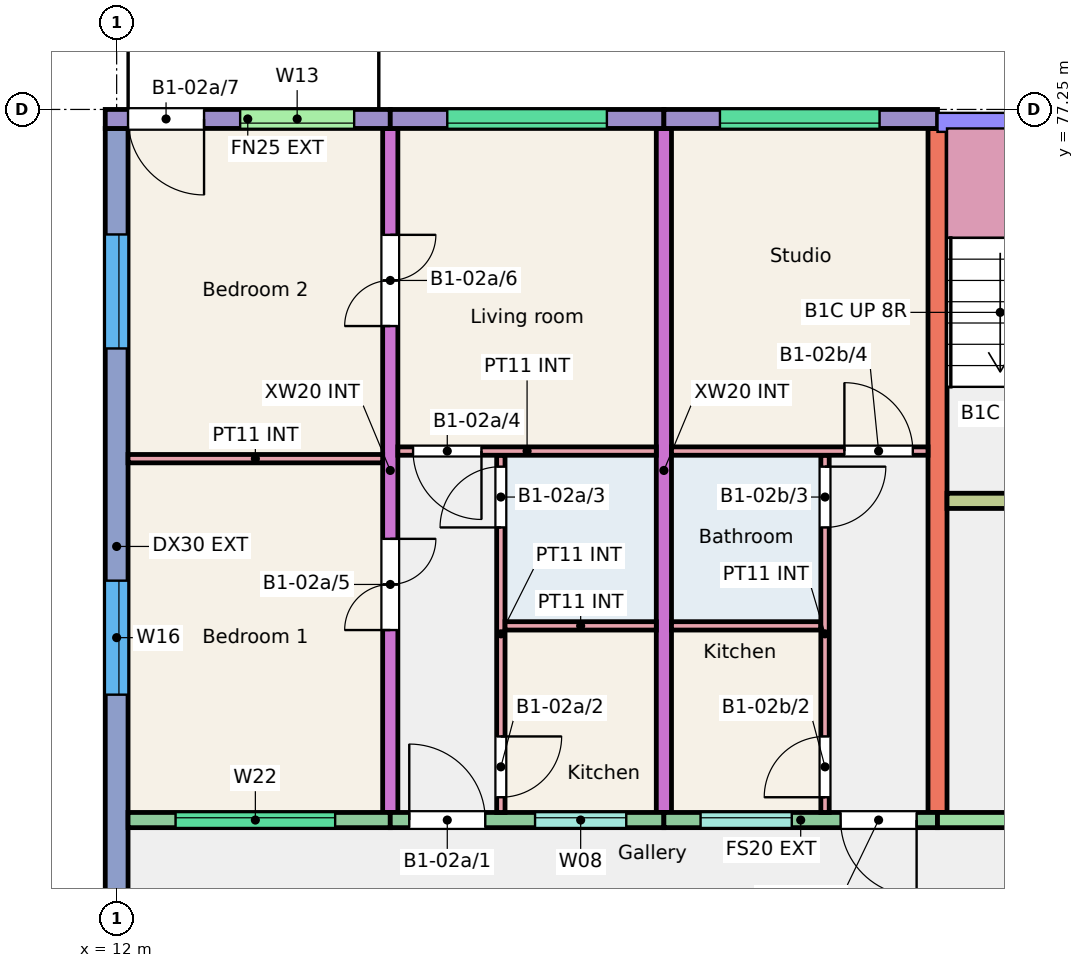
"""IFC4 building model, lengths in metres.
Left out: names, types, materials, properties, quantities, classifications, styles, units other than length and angle.
Written with IfcOpenShell. Run it as: python <this file> out.ifc"""

import sys

from ifc_helpers import new_model, si_unit, direction, frame, frame_2d, origin, place, context, subcontext, project, spatial, rectangle, extrude, element, fill, save


model = new_model("IFC4")
c1 = context("Model", 3, precision=1e-05, world=origin(), true_north=direction((0.0, 1.0)))
c2 = subcontext(c1, "Body", "Model", "MODEL_VIEW")
j1 = project(units=[si_unit("LENGTHUNIT", "METRE"), si_unit("PLANEANGLEUNIT", "RADIAN")], contexts=[c1])
p1 = place(None, origin())
s1 = spatial("IfcSite", under=j1, at=p1, CompositionType="ELEMENT")
p2 = place(p1, origin())
s2 = spatial("IfcBuilding", under=s1, at=p2, CompositionType="ELEMENT")
p3 = place(p2, frame((0.0, 0.0, 6.0)))
s3 = spatial("IfcBuildingStorey", under=s2, at=p3, CompositionType="ELEMENT", Elevation=6.0)
p4 = place(p3, frame((12.0, 66.0, 0.0), z_axis=(0.0, 0.0, 1.0), x_axis=(0.0, 1.0, 0.0)))
e1 = element("IfcWall", 1, at=p4, inside=s3, PredefinedType="SHEAR", context=c2, shape_type="SweptSolid", body=[
    extrude(rectangle(XDim=11.0, YDim=0.3, at=frame_2d((5.5, 0.0))), origin(), (0.0, 0.0, 1.0), 3.0),
])
p5 = place(p4, frame((3.55, 0.0, 0.9)))
e2 = element("IfcOpeningElement", 2, at=p5, cuts=e1, PredefinedType="OPENING", context=c2, shape_type="SweptSolid", body=[
    extrude(rectangle(XDim=1.5, YDim=1.5, at=frame_2d((0.75, 0.75))), frame((0.0, 0.16, 0.0), z_axis=(0.0, -1.0, 0.0), x_axis=(1.0, 0.0, 0.0)), (0.0, 0.0, 1.0), 0.32),
])
p6 = place(p4, frame((8.105, 0.0, 0.9)))
e3 = element("IfcOpeningElement", 3, at=p6, cuts=e1, PredefinedType="OPENING", context=c2, shape_type="SweptSolid", body=[
    extrude(rectangle(XDim=1.5, YDim=1.5, at=frame_2d((0.75, 0.75))), frame((0.0, 0.16, 0.0), z_axis=(0.0, -1.0, 0.0), x_axis=(1.0, 0.0, 0.0)), (0.0, 0.0, 1.0), 0.32),
])
p7 = place(p3, frame((15.6, 68.0, 0.0), z_axis=(0.0, 0.0, 1.0), x_axis=(0.0, 1.0, 0.0)))
e4 = element("IfcWall", 4, at=p7, inside=s3, PredefinedType="SHEAR", context=c2, shape_type="SweptSolid", body=[
    extrude(rectangle(XDim=9.0, YDim=0.2, at=frame_2d((4.5, 0.0))), origin(), (0.0, 0.0, 1.0), 3.0),
])
p8 = place(p7, frame((2.4, 0.0, 0.0)))
e5 = element("IfcOpeningElement", 5, at=p8, cuts=e4, PredefinedType="OPENING", context=c2, shape_type="SweptSolid", body=[
    extrude(rectangle(XDim=1.2, YDim=2.1, at=frame_2d((0.6, 1.05))), frame((0.0, 0.11, 0.0), z_axis=(0.0, -1.0, 0.0), x_axis=(1.0, 0.0, 0.0)), (0.0, 0.0, 1.0), 0.22),
])
p9 = place(p7, frame((6.4, 0.0, 0.0)))
e6 = element("IfcOpeningElement", 6, at=p9, cuts=e4, PredefinedType="OPENING", context=c2, shape_type="SweptSolid", body=[
    extrude(rectangle(XDim=1.2, YDim=2.1, at=frame_2d((0.6, 1.05))), frame((0.0, 0.11, 0.0), z_axis=(0.0, -1.0, 0.0), x_axis=(1.0, 0.0, 0.0)), (0.0, 0.0, 1.0), 0.22),
])
p10 = place(p3, frame((19.2, 68.0, 0.0), z_axis=(0.0, 0.0, 1.0), x_axis=(0.0, 1.0, 0.0)))
e7 = element("IfcWall", 7, at=p10, inside=s3, PredefinedType="SHEAR", context=c2, shape_type="SweptSolid", body=[
    extrude(rectangle(XDim=9.0, YDim=0.2, at=frame_2d((4.5, 0.0))), origin(), (0.0, 0.0, 1.0), 3.0),
])
p11 = place(p3, frame((22.8, 68.0, 0.0), z_axis=(0.0, 0.0, 1.0), x_axis=(0.0, 1.0, 0.0)))
e8 = element("IfcWall", 8, at=p11, inside=s3, PredefinedType="SHEAR", context=c2, shape_type="SweptSolid", body=[
    extrude(rectangle(XDim=9.0, YDim=0.25, at=frame_2d((4.5, 0.0))), origin(), (0.0, 0.0, 1.0), 3.0),
])
p12 = place(p3, frame((11.85, 77.125, 0.0), z_axis=(0.0, 0.0, 1.0), x_axis=(1.0, 0.0, 0.0)))
e9 = element("IfcWall", 9, at=p12, inside=s3, PredefinedType="SOLIDWALL", context=c2, shape_type="SweptSolid", body=[
    extrude(rectangle(XDim=3.75, YDim=0.25, at=frame_2d((1.875, 0.0))), origin(), (0.0, 0.0, 1.0), 3.0),
])
p13 = place(p12, frame((1.775, 0.0, 1.2)))
e10 = element("IfcOpeningElement", 10, at=p13, cuts=e9, PredefinedType="OPENING", context=c2, shape_type="SweptSolid", body=[
    extrude(rectangle(XDim=1.5, YDim=1.2, at=frame_2d((0.75, 0.6))), frame((0.0, 0.135, 0.0), z_axis=(0.0, -1.0, 0.0), x_axis=(1.0, 0.0, 0.0)), (0.0, 0.0, 1.0), 0.27),
])
p14 = place(p12, frame((0.3, 0.0, 0.0)))
e11 = element("IfcOpeningElement", 11, at=p14, cuts=e9, PredefinedType="OPENING", context=c2, shape_type="SweptSolid", body=[
    extrude(rectangle(XDim=1.0, YDim=2.1, at=frame_2d((0.5, 1.05))), frame((0.0, 0.135, 0.0), z_axis=(0.0, -1.0, 0.0), x_axis=(1.0, 0.0, 0.0)), (0.0, 0.0, 1.0), 0.27),
])
p15 = place(p3, frame((12.15, 67.9, 0.0), z_axis=(0.0, 0.0, 1.0), x_axis=(1.0, 0.0, 0.0)))
e12 = element("IfcWall", 12, at=p15, inside=s3, PredefinedType="SOLIDWALL", context=c2, shape_type="SweptSolid", body=[
    extrude(rectangle(XDim=3.45, YDim=0.2, at=frame_2d((1.725, 0.0))), origin(), (0.0, 0.0, 1.0), 3.0),
])
p16 = place(p15, frame((0.625, 0.0, 1.2)))
e13 = element("IfcOpeningElement", 13, at=p16, cuts=e12, PredefinedType="OPENING", context=c2, shape_type="SweptSolid", body=[
    extrude(rectangle(XDim=2.1, YDim=1.2, at=frame_2d((1.05, 0.6))), frame((0.0, 0.11, 0.0), z_axis=(0.0, -1.0, 0.0), x_axis=(1.0, 0.0, 0.0)), (0.0, 0.0, 1.0), 0.22),
])
p17 = place(p3, frame((15.6, 77.125, 0.0), z_axis=(0.0, 0.0, 1.0), x_axis=(1.0, 0.0, 0.0)))
e14 = element("IfcWall", 14, at=p17, inside=s3, PredefinedType="SOLIDWALL", context=c2, shape_type="SweptSolid", body=[
    extrude(rectangle(XDim=3.6, YDim=0.25, at=frame_2d((1.8, 0.0))), origin(), (0.0, 0.0, 1.0), 3.0),
])
p18 = place(p17, frame((0.75, 0.0, 1.2)))
e15 = element("IfcOpeningElement", 15, at=p18, cuts=e14, PredefinedType="OPENING", context=c2, shape_type="SweptSolid", body=[
    extrude(rectangle(XDim=2.1, YDim=1.2, at=frame_2d((1.05, 0.6))), frame((0.0, 0.135, 0.0), z_axis=(0.0, -1.0, 0.0), x_axis=(1.0, 0.0, 0.0)), (0.0, 0.0, 1.0), 0.27),
])
p19 = place(p3, frame((15.6, 67.9, 0.0), z_axis=(0.0, 0.0, 1.0), x_axis=(1.0, 0.0, 0.0)))
e16 = element("IfcWall", 16, at=p19, inside=s3, PredefinedType="SOLIDWALL", context=c2, shape_type="SweptSolid", body=[
    extrude(rectangle(XDim=3.6, YDim=0.2, at=frame_2d((1.8, 0.0))), origin(), (0.0, 0.0, 1.0), 3.0),
])
p20 = place(p19, frame((1.905, 0.0, 1.1)))
e17 = element("IfcOpeningElement", 17, at=p20, cuts=e16, PredefinedType="OPENING", context=c2, shape_type="SweptSolid", body=[
    extrude(rectangle(XDim=1.2, YDim=1.3, at=frame_2d((0.6, 0.65))), frame((0.0, 0.11, 0.0), z_axis=(0.0, -1.0, 0.0), x_axis=(1.0, 0.0, 0.0)), (0.0, 0.0, 1.0), 0.22),
])
p21 = place(p19, frame((0.25, 0.0, 0.0)))
e18 = element("IfcOpeningElement", 18, at=p21, cuts=e16, PredefinedType="OPENING", context=c2, shape_type="SweptSolid", body=[
    extrude(rectangle(XDim=1.0, YDim=2.1, at=frame_2d((0.5, 1.05))), frame((0.0, 0.11, 0.0), z_axis=(0.0, -1.0, 0.0), x_axis=(1.0, 0.0, 0.0)), (0.0, 0.0, 1.0), 0.22),
])
p22 = place(p3, frame((19.2, 77.125, 0.0), z_axis=(0.0, 0.0, 1.0), x_axis=(1.0, 0.0, 0.0)))
e19 = element("IfcWall", 19, at=p22, inside=s3, PredefinedType="SOLIDWALL", context=c2, shape_type="SweptSolid", body=[
    extrude(rectangle(XDim=3.6, YDim=0.25, at=frame_2d((1.8, 0.0))), origin(), (0.0, 0.0, 1.0), 3.0),
])
p23 = place(p22, frame((0.738, 0.0, 1.2)))
e20 = element("IfcOpeningElement", 20, at=p23, cuts=e19, PredefinedType="OPENING", context=c2, shape_type="SweptSolid", body=[
    extrude(rectangle(XDim=2.1, YDim=1.2, at=frame_2d((1.05, 0.6))), frame((0.0, 0.135, 0.0), z_axis=(0.0, -1.0, 0.0), x_axis=(1.0, 0.0, 0.0)), (0.0, 0.0, 1.0), 0.27),
])
p24 = place(p3, frame((19.2, 67.9, 0.0), z_axis=(0.0, 0.0, 1.0), x_axis=(1.0, 0.0, 0.0)))
e21 = element("IfcWall", 21, at=p24, inside=s3, PredefinedType="SOLIDWALL", context=c2, shape_type="SweptSolid", body=[
    extrude(rectangle(XDim=3.6, YDim=0.2, at=frame_2d((1.8, 0.0))), origin(), (0.0, 0.0, 1.0), 3.0),
])
p25 = place(p24, frame((0.482, 0.0, 1.1)))
e22 = element("IfcOpeningElement", 22, at=p25, cuts=e21, PredefinedType="OPENING", context=c2, shape_type="SweptSolid", body=[
    extrude(rectangle(XDim=1.2, YDim=1.3, at=frame_2d((0.6, 0.65))), frame((0.0, 0.11, 0.0), z_axis=(0.0, -1.0, 0.0), x_axis=(1.0, 0.0, 0.0)), (0.0, 0.0, 1.0), 0.22),
])
p26 = place(p24, frame((2.325, 0.0, 0.0)))
e23 = element("IfcOpeningElement", 23, at=p26, cuts=e21, PredefinedType="OPENING", context=c2, shape_type="SweptSolid", body=[
    extrude(rectangle(XDim=1.0, YDim=2.1, at=frame_2d((0.5, 1.05))), frame((0.0, 0.11, 0.0), z_axis=(0.0, -1.0, 0.0), x_axis=(1.0, 0.0, 0.0)), (0.0, 0.0, 1.0), 0.22),
])
p27 = place(p3, frame((22.8, 67.9, 0.0), z_axis=(0.0, 0.0, 1.0), x_axis=(1.0, 0.0, 0.0)))
e24 = element("IfcWall", 24, at=p27, inside=s3, PredefinedType="SHEAR", context=c2, shape_type="SweptSolid", body=[
    extrude(rectangle(XDim=5.85, YDim=0.2, at=frame_2d((2.925, 0.0))), origin(), (0.0, 0.0, 1.0), 3.0),
])
p28 = place(p27, frame((2.438, 0.0, 0.0)))
e25 = element("IfcOpeningElement", 25, at=p28, cuts=e24, PredefinedType="OPENING", context=c2, shape_type="SweptSolid", body=[
    extrude(rectangle(XDim=1.1, YDim=2.1, at=frame_2d((0.55, 1.05))), frame((0.0, 0.11, 0.0), z_axis=(0.0, -1.0, 0.0), x_axis=(1.0, 0.0, 0.0)), (0.0, 0.0, 1.0), 0.22),
])
p29 = place(p3, frame((22.925, 72.1, 0.0), z_axis=(0.0, 0.0, 1.0), x_axis=(1.0, 0.0, 0.0)))
e26 = element("IfcWall", 26, at=p29, inside=s3, PredefinedType="SHEAR", context=c2, shape_type="SweptSolid", body=[
    extrude(rectangle(XDim=5.725, YDim=0.2, at=frame_2d((2.862, 0.0))), origin(), (0.0, 0.0, 1.0), 3.0),
])
p30 = place(p29, frame((0.95, 0.0, 0.0)))
e27 = element("IfcOpeningElement", 27, at=p30, cuts=e26, PredefinedType="OPENING", context=c2, shape_type="SweptSolid", body=[
    extrude(rectangle(XDim=1.0, YDim=2.1, at=frame_2d((0.5, 1.05))), frame((0.0, 0.11, 0.0), z_axis=(0.0, -1.0, 0.0), x_axis=(1.0, 0.0, 0.0)), (0.0, 0.0, 1.0), 0.22),
])
p31 = place(p29, frame((3.863, 0.0, 0.0)))
e28 = element("IfcOpeningElement", 28, at=p31, cuts=e26, PredefinedType="OPENING", context=c2, shape_type="SweptSolid", body=[
    extrude(rectangle(XDim=1.1, YDim=2.1, at=frame_2d((0.55, 1.05))), frame((0.0, 0.11, 0.0), z_axis=(0.0, -1.0, 0.0), x_axis=(1.0, 0.0, 0.0)), (0.0, 0.0, 1.0), 0.22),
])
p32 = place(p3, frame((17.055, 68.0, 0.0), z_axis=(0.0, 0.0, 1.0), x_axis=(0.0, 1.0, 0.0)))
e29 = element("IfcWall", 29, at=p32, inside=s3, PredefinedType="PARTITIONING", context=c2, shape_type="SweptSolid", body=[
    extrude(rectangle(XDim=4.7, YDim=0.11, at=frame_2d((2.35, 0.0))), origin(), (0.0, 0.0, 1.0), 2.8),
])
p33 = place(p32, frame((0.2, 0.0, 0.0)))
e30 = element("IfcOpeningElement", 30, at=p33, cuts=e29, PredefinedType="OPENING", context=c2, shape_type="SweptSolid", body=[
    extrude(rectangle(XDim=0.8, YDim=2.1, at=frame_2d((0.4, 1.05))), frame((0.0, 0.065, 0.0), z_axis=(0.0, -1.0, 0.0), x_axis=(1.0, 0.0, 0.0)), (0.0, 0.0, 1.0), 0.13),
])
p34 = place(p32, frame((3.75, 0.0, 0.0)))
e31 = element("IfcOpeningElement", 31, at=p34, cuts=e29, PredefinedType="OPENING", context=c2, shape_type="SweptSolid", body=[
    extrude(rectangle(XDim=0.8, YDim=2.1, at=frame_2d((0.4, 1.05))), frame((0.0, 0.065, 0.0), z_axis=(0.0, -1.0, 0.0), x_axis=(1.0, 0.0, 0.0)), (0.0, 0.0, 1.0), 0.13),
])
p35 = place(p3, frame((17.11, 70.455, 0.0), z_axis=(0.0, 0.0, 1.0), x_axis=(1.0, 0.0, 0.0)))
e32 = element("IfcWall", 32, at=p35, inside=s3, PredefinedType="PARTITIONING", context=c2, shape_type="SweptSolid", body=[
    extrude(rectangle(XDim=1.99, YDim=0.11, at=frame_2d((0.995, 0.0))), origin(), (0.0, 0.0, 1.0), 2.8),
])
p36 = place(p3, frame((15.7, 72.755, 0.0), z_axis=(0.0, 0.0, 1.0), x_axis=(1.0, 0.0, 0.0)))
e33 = element("IfcWall", 33, at=p36, inside=s3, PredefinedType="PARTITIONING", context=c2, shape_type="SweptSolid", body=[
    extrude(rectangle(XDim=3.4, YDim=0.11, at=frame_2d((1.7, 0.0))), origin(), (0.0, 0.0, 1.0), 2.8),
])
p37 = place(p36, frame((0.2, 0.0, 0.0)))
e34 = element("IfcOpeningElement", 34, at=p37, cuts=e33, PredefinedType="OPENING", context=c2, shape_type="SweptSolid", body=[
    extrude(rectangle(XDim=0.9, YDim=2.1, at=frame_2d((0.45, 1.05))), frame((0.0, 0.065, 0.0), z_axis=(0.0, -1.0, 0.0), x_axis=(1.0, 0.0, 0.0)), (0.0, 0.0, 1.0), 0.13),
])
p38 = place(p3, frame((12.15, 72.655, 0.0), z_axis=(0.0, 0.0, 1.0), x_axis=(1.0, 0.0, 0.0)))
e35 = element("IfcWall", 35, at=p38, inside=s3, PredefinedType="PARTITIONING", context=c2, shape_type="SweptSolid", body=[
    extrude(rectangle(XDim=3.35, YDim=0.11, at=frame_2d((1.675, 0.0))), origin(), (0.0, 0.0, 1.0), 2.8),
])
p39 = place(p3, frame((19.3, 70.455, 0.0), z_axis=(0.0, 0.0, 1.0), x_axis=(1.0, 0.0, 0.0)))
e36 = element("IfcWall", 36, at=p39, inside=s3, PredefinedType="PARTITIONING", context=c2, shape_type="SweptSolid", body=[
    extrude(rectangle(XDim=1.965, YDim=0.11, at=frame_2d((0.982, 0.0))), origin(), (0.0, 0.0, 1.0), 2.8),
])
p40 = place(p3, frame((21.32, 68.0, 0.0), z_axis=(0.0, 0.0, 1.0), x_axis=(0.0, 1.0, 0.0)))
e37 = element("IfcWall", 37, at=p40, inside=s3, PredefinedType="PARTITIONING", context=c2, shape_type="SweptSolid", body=[
    extrude(rectangle(XDim=4.7, YDim=0.11, at=frame_2d((2.35, 0.0))), origin(), (0.0, 0.0, 1.0), 2.8),
])
p41 = place(p40, frame((0.2, 0.0, 0.0)))
e38 = element("IfcOpeningElement", 38, at=p41, cuts=e37, PredefinedType="OPENING", context=c2, shape_type="SweptSolid", body=[
    extrude(rectangle(XDim=0.8, YDim=2.1, at=frame_2d((0.4, 1.05))), frame((0.0, 0.065, 0.0), z_axis=(0.0, -1.0, 0.0), x_axis=(1.0, 0.0, 0.0)), (0.0, 0.0, 1.0), 0.13),
])
p42 = place(p40, frame((3.75, 0.0, 0.0)))
e39 = element("IfcOpeningElement", 39, at=p42, cuts=e37, PredefinedType="OPENING", context=c2, shape_type="SweptSolid", body=[
    extrude(rectangle(XDim=0.8, YDim=2.1, at=frame_2d((0.4, 1.05))), frame((0.0, 0.065, 0.0), z_axis=(0.0, -1.0, 0.0), x_axis=(1.0, 0.0, 0.0)), (0.0, 0.0, 1.0), 0.13),
])
p43 = place(p3, frame((19.3, 72.755, 0.0), z_axis=(0.0, 0.0, 1.0), x_axis=(1.0, 0.0, 0.0)))
e40 = element("IfcWall", 40, at=p43, inside=s3, PredefinedType="PARTITIONING", context=c2, shape_type="SweptSolid", body=[
    extrude(rectangle(XDim=3.375, YDim=0.11, at=frame_2d((1.688, 0.0))), origin(), (0.0, 0.0, 1.0), 2.8),
])
p44 = place(p43, frame((2.275, 0.0, 0.0)))
e41 = element("IfcOpeningElement", 41, at=p44, cuts=e40, PredefinedType="OPENING", context=c2, shape_type="SweptSolid", body=[
    extrude(rectangle(XDim=0.9, YDim=2.1, at=frame_2d((0.45, 1.05))), frame((0.0, 0.065, 0.0), z_axis=(0.0, -1.0, 0.0), x_axis=(1.0, 0.0, 0.0)), (0.0, 0.0, 1.0), 0.13),
])
p45 = place(p16, origin())
e42 = element("IfcWindow", 42, at=p45, inside=s3, PartitioningType="SINGLE_PANEL", PredefinedType="WINDOW", context=c2, shape_type="SweptSolid", body=[
    extrude(rectangle(XDim=2.1, YDim=1.2, at=frame_2d((1.05, 0.6))), frame((0.0, 0.06, 0.0), z_axis=(0.0, -1.0, 0.0), x_axis=(1.0, 0.0, 0.0)), (0.0, 0.0, 1.0), 0.06),
])
fill(e13, e42)
p46 = place(p13, origin())
e43 = element("IfcWindow", 43, at=p46, inside=s3, PartitioningType="SINGLE_PANEL", PredefinedType="WINDOW", context=c2, shape_type="SweptSolid", body=[
    extrude(rectangle(XDim=1.5, YDim=1.2, at=frame_2d((0.75, 0.6))), frame((0.0, -0.025, 0.0), z_axis=(0.0, -1.0, 0.0), x_axis=(1.0, 0.0, 0.0)), (0.0, 0.0, 1.0), 0.06),
])
fill(e10, e43)
p47 = place(p20, origin())
e44 = element("IfcWindow", 44, at=p47, inside=s3, PartitioningType="SINGLE_PANEL", PredefinedType="WINDOW", context=c2, shape_type="SweptSolid", body=[
    extrude(rectangle(XDim=1.2, YDim=1.3, at=frame_2d((0.6, 0.65))), frame((0.0, 0.06, 0.0), z_axis=(0.0, -1.0, 0.0), x_axis=(1.0, 0.0, 0.0)), (0.0, 0.0, 1.0), 0.06),
])
fill(e17, e44)
p48 = place(p18, origin())
e45 = element("IfcWindow", 45, at=p48, inside=s3, PartitioningType="SINGLE_PANEL", PredefinedType="WINDOW", context=c2, shape_type="SweptSolid", body=[
    extrude(rectangle(XDim=2.1, YDim=1.2, at=frame_2d((1.05, 0.6))), frame((0.0, -0.025, 0.0), z_axis=(0.0, -1.0, 0.0), x_axis=(1.0, 0.0, 0.0)), (0.0, 0.0, 1.0), 0.06),
])
fill(e15, e45)
p49 = place(p5, origin())
e46 = element("IfcWindow", 46, at=p49, inside=s3, PartitioningType="SINGLE_PANEL", PredefinedType="WINDOW", context=c2, shape_type="SweptSolid", body=[
    extrude(rectangle(XDim=1.5, YDim=1.5, at=frame_2d((0.75, 0.75))), frame((0.0, 0.0, 0.0), z_axis=(0.0, -1.0, 0.0), x_axis=(1.0, 0.0, 0.0)), (0.0, 0.0, 1.0), 0.06),
])
fill(e2, e46)
p50 = place(p6, origin())
e47 = element("IfcWindow", 47, at=p50, inside=s3, PartitioningType="SINGLE_PANEL", PredefinedType="WINDOW", context=c2, shape_type="SweptSolid", body=[
    extrude(rectangle(XDim=1.5, YDim=1.5, at=frame_2d((0.75, 0.75))), frame((0.0, 0.0, 0.0), z_axis=(0.0, -1.0, 0.0), x_axis=(1.0, 0.0, 0.0)), (0.0, 0.0, 1.0), 0.06),
])
fill(e3, e47)
p51 = place(p25, origin())
e48 = element("IfcWindow", 48, at=p51, inside=s3, PartitioningType="SINGLE_PANEL", PredefinedType="WINDOW", context=c2, shape_type="SweptSolid", body=[
    extrude(rectangle(XDim=1.2, YDim=1.3, at=frame_2d((0.6, 0.65))), frame((0.0, 0.06, 0.0), z_axis=(0.0, -1.0, 0.0), x_axis=(1.0, 0.0, 0.0)), (0.0, 0.0, 1.0), 0.06),
])
fill(e22, e48)
p52 = place(p23, origin())
e49 = element("IfcWindow", 49, at=p52, inside=s3, PartitioningType="SINGLE_PANEL", PredefinedType="WINDOW", context=c2, shape_type="SweptSolid", body=[
    extrude(rectangle(XDim=2.1, YDim=1.2, at=frame_2d((1.05, 0.6))), frame((0.0, -0.025, 0.0), z_axis=(0.0, -1.0, 0.0), x_axis=(1.0, 0.0, 0.0)), (0.0, 0.0, 1.0), 0.06),
])
fill(e20, e49)
p53 = place(p21, origin())
e50 = element("IfcDoor", 50, at=p53, inside=s3, OperationType="SINGLE_SWING_LEFT", PredefinedType="DOOR", context=c2, shape_type="SweptSolid", body=[
    extrude(rectangle(XDim=1.0, YDim=2.1, at=frame_2d((0.5, 1.05))), frame((0.0, 0.025, 0.0), z_axis=(0.0, -1.0, 0.0), x_axis=(1.0, 0.0, 0.0)), (0.0, 0.0, 1.0), 0.05),
])
fill(e18, e50)
p54 = place(p33, origin())
e51 = element("IfcDoor", 51, at=p54, inside=s3, OperationType="SINGLE_SWING_RIGHT", PredefinedType="DOOR", context=c2, shape_type="SweptSolid", body=[
    extrude(rectangle(XDim=0.8, YDim=2.1, at=frame_2d((0.4, 1.05))), frame((0.0, 0.025, 0.0), z_axis=(0.0, -1.0, 0.0), x_axis=(1.0, 0.0, 0.0)), (0.0, 0.0, 1.0), 0.05),
])
fill(e30, e51)
p55 = place(p34, origin())
e52 = element("IfcDoor", 52, at=p55, inside=s3, OperationType="SINGLE_SWING_LEFT", PredefinedType="DOOR", context=c2, shape_type="SweptSolid", body=[
    extrude(rectangle(XDim=0.8, YDim=2.1, at=frame_2d((0.4, 1.05))), frame((0.0, 0.025, 0.0), z_axis=(0.0, -1.0, 0.0), x_axis=(1.0, 0.0, 0.0)), (0.0, 0.0, 1.0), 0.05),
])
fill(e31, e52)
p56 = place(p37, origin())
e53 = element("IfcDoor", 53, at=p56, inside=s3, OperationType="SINGLE_SWING_RIGHT", PredefinedType="DOOR", context=c2, shape_type="SweptSolid", body=[
    extrude(rectangle(XDim=0.9, YDim=2.1, at=frame_2d((0.45, 1.05))), frame((0.0, 0.025, 0.0), z_axis=(0.0, -1.0, 0.0), x_axis=(1.0, 0.0, 0.0)), (0.0, 0.0, 1.0), 0.05),
])
fill(e34, e53)
p57 = place(p8, origin())
e54 = element("IfcDoor", 54, at=p57, inside=s3, OperationType="DOUBLE_DOOR_SINGLE_SWING", PredefinedType="DOOR", context=c2, shape_type="SweptSolid", body=[
    extrude(rectangle(XDim=1.2, YDim=2.1, at=frame_2d((0.6, 1.05))), frame((0.0, 0.025, 0.0), z_axis=(0.0, -1.0, 0.0), x_axis=(1.0, 0.0, 0.0)), (0.0, 0.0, 1.0), 0.05),
])
fill(e5, e54)
p58 = place(p9, origin())
e55 = element("IfcDoor", 55, at=p58, inside=s3, OperationType="DOUBLE_DOOR_SINGLE_SWING", PredefinedType="DOOR", context=c2, shape_type="SweptSolid", body=[
    extrude(rectangle(XDim=1.2, YDim=2.1, at=frame_2d((0.6, 1.05))), frame((0.0, 0.025, 0.0), z_axis=(0.0, -1.0, 0.0), x_axis=(1.0, 0.0, 0.0)), (0.0, 0.0, 1.0), 0.05),
])
fill(e6, e55)
p59 = place(p14, origin())
e56 = element("IfcDoor", 56, at=p59, inside=s3, OperationType="SINGLE_SWING_RIGHT", PredefinedType="DOOR", context=c2, shape_type="SweptSolid", body=[
    extrude(rectangle(XDim=1.0, YDim=2.1, at=frame_2d((0.5, 1.05))), frame((0.0, 0.025, 0.0), z_axis=(0.0, -1.0, 0.0), x_axis=(1.0, 0.0, 0.0)), (0.0, 0.0, 1.0), 0.05),
])
fill(e11, e56)
p60 = place(p26, origin())
e57 = element("IfcDoor", 57, at=p60, inside=s3, OperationType="SINGLE_SWING_RIGHT", PredefinedType="DOOR", context=c2, shape_type="SweptSolid", body=[
    extrude(rectangle(XDim=1.0, YDim=2.1, at=frame_2d((0.5, 1.05))), frame((0.0, 0.025, 0.0), z_axis=(0.0, -1.0, 0.0), x_axis=(1.0, 0.0, 0.0)), (0.0, 0.0, 1.0), 0.05),
])
fill(e23, e57)
p61 = place(p41, origin())
e58 = element("IfcDoor", 58, at=p61, inside=s3, OperationType="SINGLE_SWING_LEFT", PredefinedType="DOOR", context=c2, shape_type="SweptSolid", body=[
    extrude(rectangle(XDim=0.8, YDim=2.1, at=frame_2d((0.4, 1.05))), frame((0.0, 0.025, 0.0), z_axis=(0.0, -1.0, 0.0), x_axis=(1.0, 0.0, 0.0)), (0.0, 0.0, 1.0), 0.05),
])
fill(e38, e58)
p62 = place(p42, origin())
e59 = element("IfcDoor", 59, at=p62, inside=s3, OperationType="SINGLE_SWING_RIGHT", PredefinedType="DOOR", context=c2, shape_type="SweptSolid", body=[
    extrude(rectangle(XDim=0.8, YDim=2.1, at=frame_2d((0.4, 1.05))), frame((0.0, 0.025, 0.0), z_axis=(0.0, -1.0, 0.0), x_axis=(1.0, 0.0, 0.0)), (0.0, 0.0, 1.0), 0.05),
])
fill(e39, e59)
p63 = place(p44, origin())
e60 = element("IfcDoor", 60, at=p63, inside=s3, OperationType="SINGLE_SWING_LEFT", PredefinedType="DOOR", context=c2, shape_type="SweptSolid", body=[
    extrude(rectangle(XDim=0.9, YDim=2.1, at=frame_2d((0.45, 1.05))), frame((0.0, 0.025, 0.0), z_axis=(0.0, -1.0, 0.0), x_axis=(1.0, 0.0, 0.0)), (0.0, 0.0, 1.0), 0.05),
])
fill(e41, e60)
save(model, sys.argv[1])
